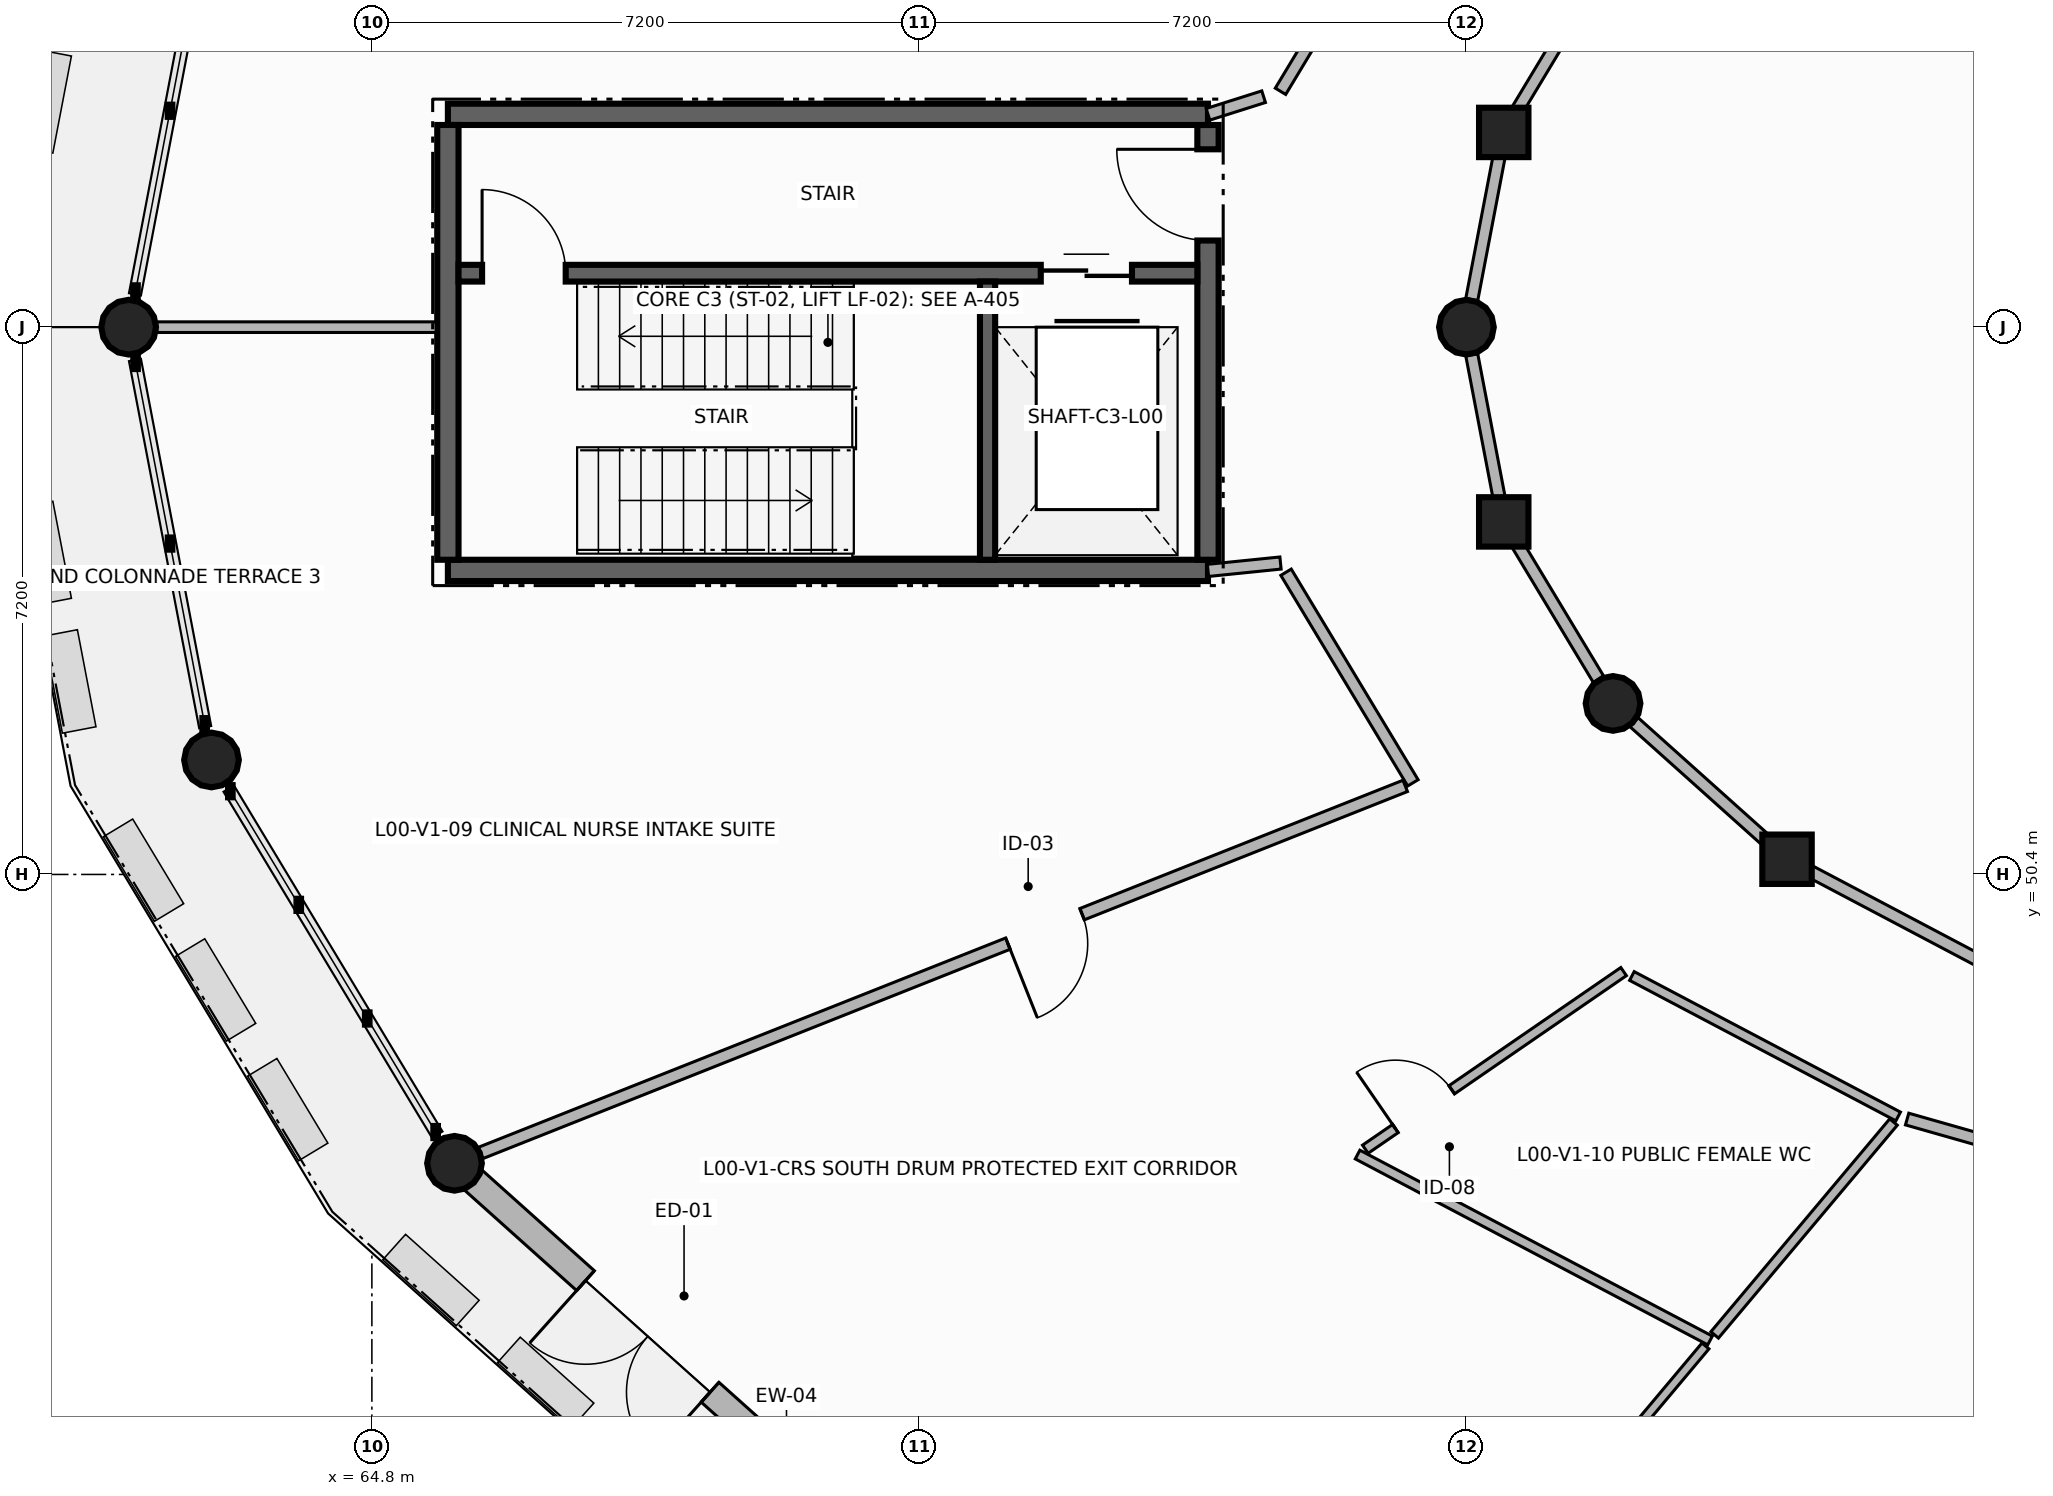
"""IFC4 building model, lengths in metres.
Left out: names, types, materials, properties, quantities, classifications, styles, units other than length and angle.
Written with IfcOpenShell. Run it as: python <this file> out.ifc"""

import sys

from ifc_helpers import new_model, si_unit, direction, frame, frame_2d, origin, origin_2d, place, context, subcontext, project, spatial, rectangle, circle, extrude, element, fill, save


model = new_model("IFC4")
c1 = context("Model", 3, precision=1e-05, world=origin(), true_north=direction((0.0, 1.0)))
c2 = subcontext(c1, "Body", "Model", "MODEL_VIEW")
j1 = project(units=[si_unit("LENGTHUNIT", "METRE"), si_unit("PLANEANGLEUNIT", "RADIAN")], contexts=[c1])
p1 = place(None, origin())
s1 = spatial("IfcSite", under=j1, at=p1, CompositionType="ELEMENT")
p2 = place(p1, origin())
s2 = spatial("IfcBuilding", under=s1, at=p2, CompositionType="ELEMENT")
p3 = place(p2, origin())
s3 = spatial("IfcBuildingStorey", under=s2, at=p3, CompositionType="ELEMENT", Elevation=0.0)
p4 = place(p3, frame((79.691, 60.162, -0.38), z_axis=(0.0, 0.0, 1.0), x_axis=(1.0, 0.0, 0.0)))
e1 = element("IfcColumn", 1, at=p4, inside=s3, PredefinedType="COLUMN", context=c2, shape_type="SweptSolid", body=[
    extrude(rectangle(XDim=0.65, YDim=0.65, at=origin_2d()), origin(), (0.0, 0.0, 1.0), 4.59),
])
for number, where, z_axis, x_axis in (
    (2, (61.6, 57.6, -0.38), (0.0, 0.0, 1.0), (1.0, 0.0, 0.0)),
    (3, (79.2, 57.6, -0.38), (0.0, 0.0, 1.0), (1.0, 0.0, 0.0)),
    (4, (62.69, 51.906, -0.38), (0.0, 0.0, 1.0), (1.0, 0.0, 0.0)),
):
    element("IfcColumn", number, at=place(p3, frame(where, z_axis=z_axis, x_axis=x_axis)), inside=s3, PredefinedType="COLUMN", context=c2, shape_type="SweptSolid", body=[
        extrude(circle(Radius=0.36, at=origin_2d()), origin(), (0.0, 0.0, 1.0), 4.59),
    ])
p5 = place(p3, frame((79.691, 55.038, -0.38), z_axis=(0.0, 0.0, 1.0), x_axis=(1.0, 0.0, 0.0)))
e5 = element("IfcColumn", 5, at=p5, inside=s3, PredefinedType="COLUMN", context=c2, shape_type="SweptSolid", body=[
    extrude(rectangle(XDim=0.65, YDim=0.65, at=origin_2d()), origin(), (0.0, 0.0, 1.0), 4.59),
])
for number, where, z_axis, x_axis in (
    (6, (65.887, 46.6, -0.38), (0.0, 0.0, 1.0), (1.0, 0.0, 0.0)),
    (7, (81.129, 52.65, -0.38), (0.0, 0.0, 1.0), (1.0, 0.0, 0.0)),
):
    element("IfcColumn", number, at=place(p3, frame(where, z_axis=z_axis, x_axis=x_axis)), inside=s3, PredefinedType="COLUMN", context=c2, shape_type="SweptSolid", body=[
        extrude(circle(Radius=0.36, at=origin_2d()), origin(), (0.0, 0.0, 1.0), 4.59),
    ])
p6 = place(p3, frame((83.418, 50.6, -0.38), z_axis=(0.0, 0.0, 1.0), x_axis=(1.0, 0.0, 0.0)))
e8 = element("IfcColumn", 8, at=p6, inside=s3, PredefinedType="COLUMN", context=c2, shape_type="SweptSolid", body=[
    extrude(rectangle(XDim=0.65, YDim=0.65, at=origin_2d()), origin(), (0.0, 0.0, 1.0), 4.59),
])
p7 = place(p3, frame((65.887, 46.6, 0.0), z_axis=(0.0, 0.0, 1.0), x_axis=(0.744835335723, -0.667248321585, 0.0)))
e9 = element("IfcWall", 9, at=p7, inside=s3, PredefinedType="SOLIDWALL", context=c2, shape_type="SweptSolid", body=[
    extrude(rectangle(XDim=6.828, YDim=0.35, at=frame_2d((3.414, 0.0))), origin(), (0.0, 0.0, 1.0), 3.65),
])
p8 = place(p7, frame((2.314, 0.0, 0.0)))
e10 = element("IfcOpeningElement", 10, at=p8, cuts=e9, PredefinedType="OPENING", context=c2, shape_type="SweptSolid", body=[
    extrude(rectangle(XDim=2.2, YDim=2.6, at=frame_2d((1.1, 1.3))), frame((0.0, 0.185, 0.0), z_axis=(0.0, -1.0, 0.0), x_axis=(1.0, 0.0, 0.0)), (0.0, 0.0, 1.0), 0.37),
])
p9 = place(p3, frame((65.8, 54.4, 0.0), z_axis=(0.0, 0.0, 1.0), x_axis=(1.0, 0.0, 0.0)))
e11 = element("IfcWall", 11, at=p9, inside=s3, PredefinedType="SHEAR", context=c2, shape_type="SweptSolid", body=[
    extrude(rectangle(XDim=10.0, YDim=0.28, at=frame_2d((5.0, 0.0))), origin(), (0.0, 0.0, 1.0), 4.21),
])
p10 = place(p3, frame((75.8, 54.54, 0.0), z_axis=(0.0, 0.0, 1.0), x_axis=(0.0, 1.0, 0.0)))
e12 = element("IfcWall", 12, at=p10, inside=s3, PredefinedType="SHEAR", context=c2, shape_type="SweptSolid", body=[
    extrude(rectangle(XDim=5.72, YDim=0.28, at=frame_2d((2.86, 0.0))), origin(), (0.0, 0.0, 1.0), 4.21),
])
p11 = place(p10, frame((4.2, 0.0, 0.0)))
e13 = element("IfcOpeningElement", 13, at=p11, cuts=e12, PredefinedType="OPENING", context=c2, shape_type="SweptSolid", body=[
    extrude(rectangle(XDim=1.2, YDim=2.25, at=frame_2d((0.6, 1.125))), frame((0.0, 0.15, 0.0), z_axis=(0.0, -1.0, 0.0), x_axis=(1.0, 0.0, 0.0)), (0.0, 0.0, 1.0), 0.3),
])
p12 = place(p3, frame((75.8, 60.4, 0.0), z_axis=(0.0, 0.0, 1.0), x_axis=(-1.0, 0.0, 0.0)))
e14 = element("IfcWall", 14, at=p12, inside=s3, PredefinedType="SHEAR", context=c2, shape_type="SweptSolid", body=[
    extrude(rectangle(XDim=10.0, YDim=0.28, at=frame_2d((5.0, 0.0))), origin(), (0.0, 0.0, 1.0), 4.21),
])
p13 = place(p3, frame((65.8, 60.26, 0.0), z_axis=(0.0, 0.0, 1.0), x_axis=(0.0, -1.0, 0.0)))
e15 = element("IfcWall", 15, at=p13, inside=s3, PredefinedType="SHEAR", context=c2, shape_type="SweptSolid", body=[
    extrude(rectangle(XDim=5.72, YDim=0.28, at=frame_2d((2.86, 0.0))), origin(), (0.0, 0.0, 1.0), 4.21),
])
p14 = place(p3, frame((65.94, 58.31, 0.0), z_axis=(0.0, 0.0, 1.0), x_axis=(1.0, 0.0, 0.0)))
e16 = element("IfcWall", 16, at=p14, inside=s3, PredefinedType="SHEAR", context=c2, shape_type="SweptSolid", body=[
    extrude(rectangle(XDim=9.72, YDim=0.22, at=frame_2d((4.86, 0.0))), origin(), (0.0, 0.0, 1.0), 4.21),
])
p15 = place(p14, frame((0.31, 0.0, 0.0)))
e17 = element("IfcOpeningElement", 17, at=p15, cuts=e16, PredefinedType="OPENING", context=c2, shape_type="SweptSolid", body=[
    extrude(rectangle(XDim=1.1, YDim=2.15, at=frame_2d((0.55, 1.075))), frame((0.0, 0.12, 0.0), z_axis=(0.0, -1.0, 0.0), x_axis=(1.0, 0.0, 0.0)), (0.0, 0.0, 1.0), 0.24),
])
p16 = place(p14, frame((7.66, 0.0, 0.0)))
e18 = element("IfcOpeningElement", 18, at=p16, cuts=e16, PredefinedType="OPENING", context=c2, shape_type="SweptSolid", body=[
    extrude(rectangle(XDim=1.2, YDim=2.2, at=frame_2d((0.6, 1.1))), frame((0.0, 0.12, 0.0), z_axis=(0.0, -1.0, 0.0), x_axis=(1.0, 0.0, 0.0)), (0.0, 0.0, 1.0), 0.24),
])
p17 = place(p3, frame((72.9, 54.54, 0.0), z_axis=(0.0, 0.0, 1.0), x_axis=(0.0, 1.0, 0.0)))
e19 = element("IfcWall", 19, at=p17, inside=s3, PredefinedType="SHEAR", context=c2, shape_type="SweptSolid", body=[
    extrude(rectangle(XDim=3.66, YDim=0.2, at=frame_2d((1.83, 0.0))), origin(), (0.0, 0.0, 1.0), 4.21),
])
p18 = place(p3, frame((80.938, 62.233, 0.0), z_axis=(0.0, 0.0, 1.0), x_axis=(-0.515771112958, -0.856726420182, 0.0)))
e20 = element("IfcWall", 20, at=p18, inside=s3, PredefinedType="PARTITIONING", context=c2, shape_type="SweptSolid", body=[
    extrude(rectangle(XDim=2.082, YDim=0.16, at=frame_2d((1.041, 0.0))), origin(), (0.0, 0.0, 1.0), 3.59),
])
for number, where, z_axis, x_axis in (
    (21, (79.628, 59.833, 0.0), (0.0, 0.0, 1.0), (-0.188, -0.982, 0.0)),
    (22, (79.27, 57.237, 0.0), (0.0, 0.0, 1.0), (0.188, -0.982, 0.0)),
):
    element("IfcWall", number, at=place(p3, frame(where, z_axis=z_axis, x_axis=x_axis)), inside=s3, PredefinedType="PARTITIONING", context=c2, shape_type="SweptSolid", body=[
        extrude(rectangle(XDim=1.904, YDim=0.16, at=frame_2d((0.952, 0.0))), origin(), (0.0, 0.0, 1.0), 3.59),
    ])
p19 = place(p3, frame((79.864, 54.751, 0.0), z_axis=(0.0, 0.0, 1.0), x_axis=(0.515771112958, -0.856726420182, 0.0)))
e23 = element("IfcWall", 23, at=p19, inside=s3, PredefinedType="PARTITIONING", context=c2, shape_type="SweptSolid", body=[
    extrude(rectangle(XDim=2.082, YDim=0.16, at=frame_2d((1.041, 0.0))), origin(), (0.0, 0.0, 1.0), 3.59),
])
p20 = place(p3, frame((81.405, 52.403, 0.0), z_axis=(0.0, 0.0, 1.0), x_axis=(0.744876988428, -0.667201822622, 0.0)))
e24 = element("IfcWall", 24, at=p20, inside=s3, PredefinedType="PARTITIONING", context=c2, shape_type="SweptSolid", body=[
    extrude(rectangle(XDim=2.367, YDim=0.16, at=frame_2d((1.183, 0.0))), origin(), (0.0, 0.0, 1.0), 3.59),
])
p21 = place(p3, frame((83.714, 50.444, 0.0), z_axis=(0.0, 0.0, 1.0), x_axis=(0.884361662152, -0.466802367727, 0.0)))
e25 = element("IfcWall", 25, at=p21, inside=s3, PredefinedType="PARTITIONING", context=c2, shape_type="SweptSolid", body=[
    extrude(rectangle(XDim=2.667, YDim=0.16, at=frame_2d((1.333, 0.0))), origin(), (0.0, 0.0, 1.0), 3.59),
])
p22 = place(p3, frame((65.645, 57.6, 0.0), z_axis=(0.0, 0.0, 1.0), x_axis=(-1.0, 0.0, 0.0)))
e26 = element("IfcWall", 26, at=p22, inside=s3, PredefinedType="PARTITIONING", context=c2, shape_type="SweptSolid", body=[
    extrude(rectangle(XDim=3.675, YDim=0.14, at=frame_2d((1.837, 0.0))), origin(), (0.0, 0.0, 1.0), 3.59),
])
p23 = place(p3, frame((78.445, 63.511, 0.0), z_axis=(0.0, 0.0, 1.0), x_axis=(-0.515907945316, -0.856644028731, 0.0)))
e27 = element("IfcWall", 27, at=p23, inside=s3, PredefinedType="PARTITIONING", context=c2, shape_type="SweptSolid", body=[
    extrude(rectangle(XDim=3.278, YDim=0.16, at=frame_2d((1.639, 0.0))), origin(), (0.0, 0.0, 1.0), 3.59),
])
p24 = place(p23, frame((0.48, 0.0, 0.0)))
e28 = element("IfcOpeningElement", 28, at=p24, cuts=e27, PredefinedType="OPENING", context=c2, shape_type="SweptSolid", body=[
    extrude(rectangle(XDim=1.15, YDim=2.25, at=frame_2d((0.575, 1.125))), frame((0.0, 0.09, 0.0), z_axis=(0.0, -1.0, 0.0), x_axis=(1.0, 0.0, 0.0)), (0.0, 0.0, 1.0), 0.18),
])
p25 = place(p3, frame((76.532, 60.632, 0.0), z_axis=(0.0, 0.0, 1.0), x_axis=(-0.953192648892, -0.302363645463, 0.0)))
e29 = element("IfcWall", 29, at=p25, inside=s3, PredefinedType="PARTITIONING", context=c2, shape_type="SweptSolid", body=[
    extrude(rectangle(XDim=0.768, YDim=0.16, at=frame_2d((0.384, 0.0))), origin(), (0.0, 0.0, 1.0), 3.59),
])
p26 = place(p3, frame((75.8, 54.4, 0.0), z_axis=(0.0, 0.0, 1.0), x_axis=(0.994851446462, 0.101343966136, 0.0)))
e30 = element("IfcWall", 30, at=p26, inside=s3, PredefinedType="PARTITIONING", context=c2, shape_type="SweptSolid", body=[
    extrude(rectangle(XDim=0.959, YDim=0.16, at=frame_2d((0.479, 0.0))), origin(), (0.0, 0.0, 1.0), 3.59),
])
p27 = place(p3, frame((76.827, 54.376, 0.0), z_axis=(0.0, 0.0, 1.0), x_axis=(0.515993285702, -0.85659262728, 0.0)))
e31 = element("IfcWall", 31, at=p27, inside=s3, PredefinedType="PARTITIONING", context=c2, shape_type="SweptSolid", body=[
    extrude(rectangle(XDim=3.235, YDim=0.16, at=frame_2d((1.617, 0.0))), origin(), (0.0, 0.0, 1.0), 3.59),
])
p28 = place(p3, frame((78.395, 51.565, 0.0), z_axis=(0.0, 0.0, 1.0), x_axis=(-0.929442280211, -0.368967542957, 0.0)))
e32 = element("IfcWall", 32, at=p28, inside=s3, PredefinedType="PARTITIONING", context=c2, shape_type="SweptSolid", body=[
    extrude(rectangle(XDim=13.087, YDim=0.16, at=frame_2d((6.544, 0.0))), origin(), (0.0, 0.0, 1.0), 3.59),
])
p29 = place(p28, frame((4.574, 0.0, 0.0)))
e33 = element("IfcOpeningElement", 33, at=p29, cuts=e32, PredefinedType="OPENING", context=c2, shape_type="SweptSolid", body=[
    extrude(rectangle(XDim=1.05, YDim=2.15, at=frame_2d((0.525, 1.075))), frame((0.0, 0.09, 0.0), z_axis=(0.0, -1.0, 0.0), x_axis=(1.0, 0.0, 0.0)), (0.0, 0.0, 1.0), 0.18),
])
p30 = place(p3, frame((82.405, 44.269, 0.0), z_axis=(0.0, 0.0, 1.0), x_axis=(-0.8844824522, 0.466573458042, 0.0)))
e34 = element("IfcWall", 34, at=p30, inside=s3, PredefinedType="PARTITIONING", context=c2, shape_type="SweptSolid", body=[
    extrude(rectangle(XDim=5.243, YDim=0.13, at=frame_2d((2.621, 0.0))), origin(), (0.0, 0.0, 1.0), 3.59),
])
p31 = place(p3, frame((77.87, 46.785, 0.0), z_axis=(0.0, 0.0, 1.0), x_axis=(0.823920996576, 0.566704677412, 0.0)))
e35 = element("IfcWall", 35, at=p31, inside=s3, PredefinedType="PARTITIONING", context=c2, shape_type="SweptSolid", body=[
    extrude(rectangle(XDim=4.124, YDim=0.13, at=frame_2d((2.062, 0.0))), origin(), (0.0, 0.0, 1.0), 3.59),
])
p32 = place(p31, frame((0.48, 0.0, 0.0)))
e36 = element("IfcOpeningElement", 36, at=p32, cuts=e35, PredefinedType="OPENING", context=c2, shape_type="SweptSolid", body=[
    extrude(rectangle(XDim=0.9, YDim=2.1, at=frame_2d((0.45, 1.05))), frame((0.0, 0.075, 0.0), z_axis=(0.0, -1.0, 0.0), x_axis=(1.0, 0.0, 0.0)), (0.0, 0.0, 1.0), 0.15),
])
p33 = place(p3, frame((81.377, 49.064, 0.0), z_axis=(0.0, 0.0, 1.0), x_axis=(0.884475212642, -0.466587181802, 0.0)))
e37 = element("IfcWall", 37, at=p33, inside=s3, PredefinedType="PARTITIONING", context=c2, shape_type="SweptSolid", body=[
    extrude(rectangle(XDim=3.96, YDim=0.13, at=frame_2d((1.98, 0.0))), origin(), (0.0, 0.0, 1.0), 3.59),
])
p34 = place(p3, frame((84.819, 47.143, 0.0), z_axis=(0.0, 0.0, 1.0), x_axis=(-0.643218693498, -0.765682514059, 0.0)))
e38 = element("IfcWall", 38, at=p34, inside=s3, PredefinedType="PARTITIONING", context=c2, shape_type="SweptSolid", body=[
    extrude(rectangle(XDim=3.658, YDim=0.13, at=frame_2d((1.829, 0.0))), origin(), (0.0, 0.0, 1.0), 3.59),
])
p35 = place(p3, frame((77.838, 38.83, 0.0), z_axis=(0.0, 0.0, 1.0), x_axis=(0.643095679517, 0.76578583624, 0.0)))
e39 = element("IfcWall", 39, at=p35, inside=s3, PredefinedType="PARTITIONING", context=c2, shape_type="SweptSolid", body=[
    extrude(rectangle(XDim=7.008, YDim=0.12, at=frame_2d((3.504, 0.0))), origin(), (0.0, 0.0, 1.0), 3.59),
])
p36 = place(p3, frame((84.998, 47.182, 0.0), z_axis=(0.0, 0.0, 1.0), x_axis=(0.961841952324, -0.27360566286, 0.0)))
e40 = element("IfcWall", 40, at=p36, inside=s3, PredefinedType="PARTITIONING", context=c2, shape_type="SweptSolid", body=[
    extrude(rectangle(XDim=4.25, YDim=0.16, at=frame_2d((2.125, 0.0))), origin(), (0.0, 0.0, 1.0), 3.59),
])
p37 = place(p36, frame((1.95, 0.0, 0.0)))
e41 = element("IfcOpeningElement", 41, at=p37, cuts=e40, PredefinedType="OPENING", context=c2, shape_type="SweptSolid", body=[
    extrude(rectangle(XDim=1.4, YDim=2.3, at=frame_2d((0.7, 1.15))), frame((0.0, 0.09, 0.0), z_axis=(0.0, -1.0, 0.0), x_axis=(1.0, 0.0, 0.0)), (0.0, 0.0, 1.0), 0.18),
])
p38 = place(p3, frame((89.05, 45.926, 0.0), z_axis=(0.0, 0.0, 1.0), x_axis=(-0.363176298082, -0.931720439033, 0.0)))
e42 = element("IfcWall", 42, at=p38, inside=s3, PredefinedType="PARTITIONING", context=c2, shape_type="SweptSolid", body=[
    extrude(rectangle(XDim=9.907, YDim=0.12, at=frame_2d((4.954, 0.0))), origin(), (0.0, 0.0, 1.0), 3.59),
])
p39 = place(p8, frame((2.2, 0.0, 0.0), z_axis=(0.0, 0.0, 1.0), x_axis=(-1.0, 0.0, 0.0)))
e43 = element("IfcDoor", 43, at=p39, inside=s3, OperationType="DOUBLE_DOOR_SINGLE_SWING", PredefinedType="DOOR", context=c2, shape_type="SweptSolid", body=[
    extrude(rectangle(XDim=2.2, YDim=2.6, at=frame_2d((1.1, 1.3))), frame((0.0, 0.025, 0.0), z_axis=(0.0, -1.0, 0.0), x_axis=(1.0, 0.0, 0.0)), (0.0, 0.0, 1.0), 0.05),
])
fill(e10, e43)
p40 = place(p15, origin())
e44 = element("IfcDoor", 44, at=p40, inside=s3, OperationType="SINGLE_SWING_LEFT", PredefinedType="DOOR", context=c2, shape_type="SweptSolid", body=[
    extrude(rectangle(XDim=1.1, YDim=2.15, at=frame_2d((0.55, 1.075))), frame((0.0, 0.025, 0.0), z_axis=(0.0, -1.0, 0.0), x_axis=(1.0, 0.0, 0.0)), (0.0, 0.0, 1.0), 0.05),
])
fill(e17, e44)
p41 = place(p16, origin())
e45 = element("IfcDoor", 45, at=p41, inside=s3, OperationType="DOUBLE_DOOR_SLIDING", PredefinedType="DOOR", context=c2, shape_type="SweptSolid", body=[
    extrude(rectangle(XDim=1.2, YDim=2.2, at=frame_2d((0.6, 1.1))), frame((0.0, 0.025, 0.0), z_axis=(0.0, -1.0, 0.0), x_axis=(1.0, 0.0, 0.0)), (0.0, 0.0, 1.0), 0.05),
])
fill(e18, e45)
p42 = place(p11, origin())
e46 = element("IfcDoor", 46, at=p42, inside=s3, OperationType="SINGLE_SWING_RIGHT", PredefinedType="DOOR", context=c2, shape_type="SweptSolid", body=[
    extrude(rectangle(XDim=1.2, YDim=2.25, at=frame_2d((0.6, 1.125))), frame((0.0, 0.025, 0.0), z_axis=(0.0, -1.0, 0.0), x_axis=(1.0, 0.0, 0.0)), (0.0, 0.0, 1.0), 0.05),
])
fill(e13, e46)
p43 = place(p29, origin())
e47 = element("IfcDoor", 47, at=p43, inside=s3, OperationType="SINGLE_SWING_RIGHT", PredefinedType="DOOR", context=c2, shape_type="SweptSolid", body=[
    extrude(rectangle(XDim=1.05, YDim=2.15, at=frame_2d((0.525, 1.075))), frame((0.0, 0.025, 0.0), z_axis=(0.0, -1.0, 0.0), x_axis=(1.0, 0.0, 0.0)), (0.0, 0.0, 1.0), 0.05),
])
fill(e33, e47)
p44 = place(p32, origin())
e48 = element("IfcDoor", 48, at=p44, inside=s3, OperationType="SINGLE_SWING_LEFT", PredefinedType="DOOR", context=c2, shape_type="SweptSolid", body=[
    extrude(rectangle(XDim=0.9, YDim=2.1, at=frame_2d((0.45, 1.05))), frame((0.0, 0.025, 0.0), z_axis=(0.0, -1.0, 0.0), x_axis=(1.0, 0.0, 0.0)), (0.0, 0.0, 1.0), 0.05),
])
fill(e36, e48)
save(model, sys.argv[1])
